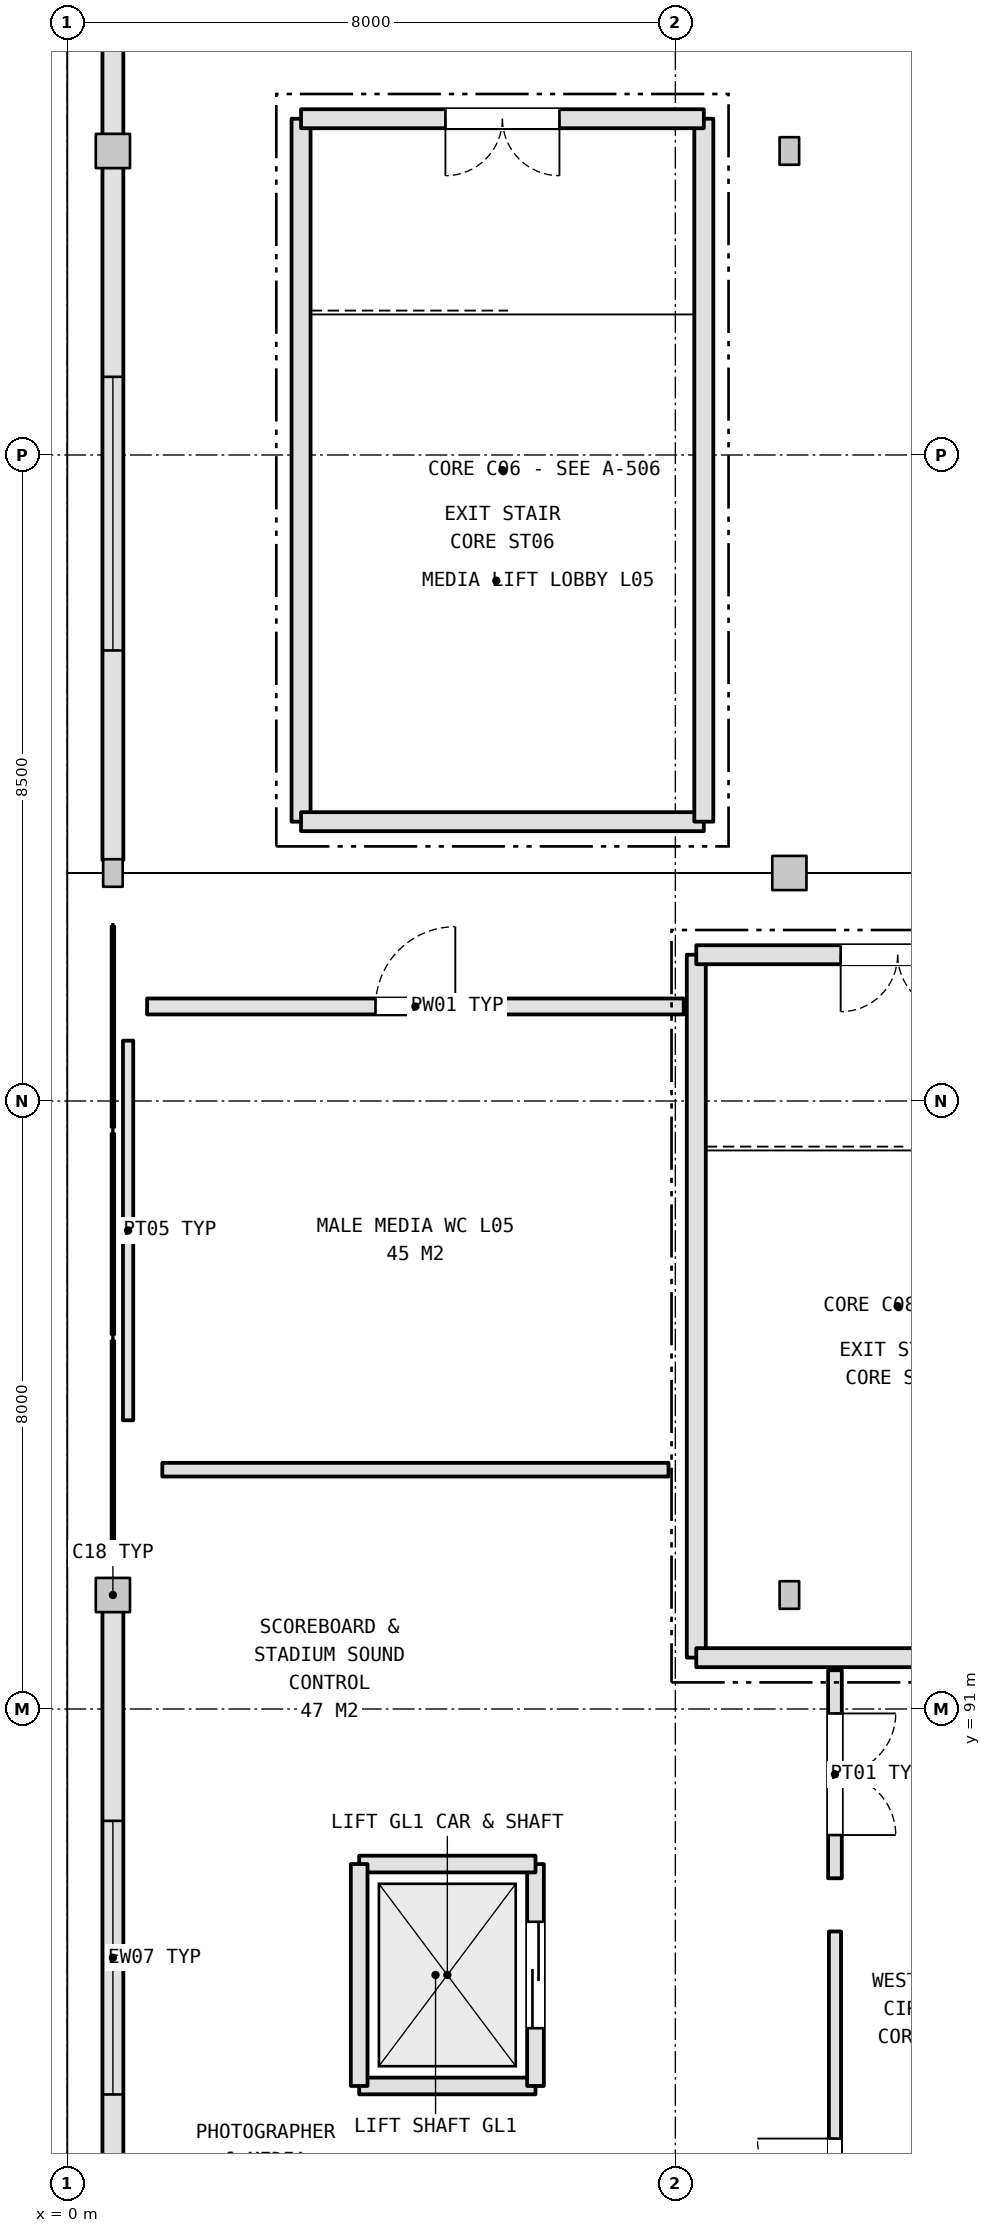
"""IFC4 building model, lengths in metres.
Left out: names, types, materials, properties, quantities, classifications, styles, units other than length and angle.
Written with IfcOpenShell. Run it as: python <this file> out.ifc"""

import sys

from ifc_helpers import new_model, si_unit, direction, frame, frame_2d, origin, origin_2d, place, context, subcontext, project, spatial, rectangle, i_section, extrude, element, fill, save


model = new_model("IFC4")
c1 = context("Model", 3, precision=1e-05, world=origin(), true_north=direction((0.0, 1.0)))
c2 = subcontext(c1, "Body", "Model", "MODEL_VIEW")
j1 = project(units=[si_unit("LENGTHUNIT", "METRE"), si_unit("PLANEANGLEUNIT", "RADIAN")], contexts=[c1])
p1 = place(None, origin())
s1 = spatial("IfcSite", under=j1, at=p1, CompositionType="ELEMENT")
p2 = place(p1, origin())
s2 = spatial("IfcBuilding", under=s1, at=p2, CompositionType="ELEMENT")
p3 = place(p2, frame((0.0, 0.0, 27.0)))
s3 = spatial("IfcBuildingStorey", under=s2, at=p3, CompositionType="ELEMENT", Elevation=27.0)
p4 = place(p3, frame((0.6, 92.5, 0.0), z_axis=(0.0, 0.0, 1.0), x_axis=(1.0, 0.0, 0.0)))
e1 = element("IfcColumn", 1, at=p4, inside=s3, PredefinedType="COLUMN", context=c2, shape_type="SweptSolid", body=[
    extrude(rectangle(XDim=0.45, YDim=0.45, at=origin_2d()), origin(), (0.0, 0.0, 1.0), 4.671),
])
p5 = place(p3, frame((0.6, 102.0, 0.0), z_axis=(0.0, 0.0, 1.0), x_axis=(1.0, 0.0, 0.0)))
e2 = element("IfcColumn", 2, at=p5, inside=s3, PredefinedType="COLUMN", context=c2, shape_type="SweptSolid", body=[
    extrude(i_section(OverallWidth=0.257, OverallDepth=0.363, WebThickness=0.013, FlangeThickness=0.022, FilletRadius=0.015, at=origin_2d()), origin(), (0.0, 0.0, 1.0), 4.671),
])
p6 = place(p3, frame((0.6, 111.5, 0.0), z_axis=(0.0, 0.0, 1.0), x_axis=(1.0, 0.0, 0.0)))
e3 = element("IfcColumn", 3, at=p6, inside=s3, PredefinedType="COLUMN", context=c2, shape_type="SweptSolid", body=[
    extrude(rectangle(XDim=0.45, YDim=0.45, at=origin_2d()), origin(), (0.0, 0.0, 1.0), 4.671),
])
p7 = place(p3, frame((9.5, 92.5, 0.0), z_axis=(0.0, 0.0, 1.0), x_axis=(1.0, 0.0, 0.0)))
e4 = element("IfcColumn", 4, at=p7, inside=s3, PredefinedType="COLUMN", context=c2, shape_type="SweptSolid", body=[
    extrude(i_section(OverallWidth=0.257, OverallDepth=0.363, WebThickness=0.013, FlangeThickness=0.022, FilletRadius=0.015, at=origin_2d()), origin(), (0.0, 0.0, 1.0), 5.428),
])
p8 = place(p3, frame((9.5, 102.0, 0.0), z_axis=(0.0, 0.0, 1.0), x_axis=(1.0, 0.0, 0.0)))
e5 = element("IfcColumn", 5, at=p8, inside=s3, PredefinedType="COLUMN", context=c2, shape_type="SweptSolid", body=[
    extrude(rectangle(XDim=0.45, YDim=0.45, at=origin_2d()), origin(), (0.0, 0.0, 1.0), 5.428),
])
p9 = place(p3, frame((9.5, 111.5, 0.0), z_axis=(0.0, 0.0, 1.0), x_axis=(1.0, 0.0, 0.0)))
e6 = element("IfcColumn", 6, at=p9, inside=s3, PredefinedType="COLUMN", context=c2, shape_type="SweptSolid", body=[
    extrude(i_section(OverallWidth=0.257, OverallDepth=0.363, WebThickness=0.013, FlangeThickness=0.022, FilletRadius=0.015, at=origin_2d()), origin(), (0.0, 0.0, 1.0), 5.428),
])
p10 = place(p3, frame((0.6, 83.169, 0.0), z_axis=(0.0, 0.0, 1.0), x_axis=(0.0, 1.0, 0.0)))
e7 = element("IfcWall", 7, at=p10, inside=s3, PredefinedType="STANDARD", context=c2, shape_type="SweptSolid", body=[
    extrude(rectangle(XDim=9.118, YDim=0.275, at=frame_2d((4.559, 0.0))), origin(), (0.0, 0.0, 1.0), 3.5),
])
p11 = place(p10, frame((2.759, 0.0, 1.05)))
e8 = element("IfcOpeningElement", 8, at=p11, cuts=e7, PredefinedType="OPENING", context=c2, shape_type="SweptSolid", body=[
    extrude(rectangle(XDim=3.6, YDim=2.0, at=frame_2d((1.8, 1.0))), frame((0.0, 0.147, 0.0), z_axis=(0.0, -1.0, 0.0), x_axis=(1.0, 0.0, 0.0)), (0.0, 0.0, 1.0), 0.295),
])
p12 = place(p3, frame((0.6, 102.169, 0.0), z_axis=(0.0, 0.0, 1.0), x_axis=(0.0, 1.0, 0.0)))
e9 = element("IfcWall", 9, at=p12, inside=s3, PredefinedType="STANDARD", context=c2, shape_type="SweptSolid", body=[
    extrude(rectangle(XDim=9.118, YDim=0.275, at=frame_2d((4.559, 0.0))), origin(), (0.0, 0.0, 1.0), 3.5),
])
p13 = place(p12, frame((2.759, 0.0, 1.05)))
e10 = element("IfcOpeningElement", 10, at=p13, cuts=e9, PredefinedType="OPENING", context=c2, shape_type="SweptSolid", body=[
    extrude(rectangle(XDim=3.6, YDim=2.0, at=frame_2d((1.8, 1.0))), frame((0.0, 0.147, 0.0), z_axis=(0.0, -1.0, 0.0), x_axis=(1.0, 0.0, 0.0)), (0.0, 0.0, 1.0), 0.295),
])
p14 = place(p3, frame((0.6, 111.713, 0.0), z_axis=(0.0, 0.0, 1.0), x_axis=(0.0, 1.0, 0.0)))
e11 = element("IfcWall", 11, at=p14, inside=s3, PredefinedType="STANDARD", context=c2, shape_type="SweptSolid", body=[
    extrude(rectangle(XDim=9.118, YDim=0.275, at=frame_2d((4.559, 0.0))), origin(), (0.0, 0.0, 1.0), 3.5),
])
p15 = place(p14, frame((2.759, 0.0, 1.05)))
e12 = element("IfcOpeningElement", 12, at=p15, cuts=e11, PredefinedType="OPENING", context=c2, shape_type="SweptSolid", body=[
    extrude(rectangle(XDim=3.6, YDim=2.0, at=frame_2d((1.8, 1.0))), frame((0.0, 0.147, 0.0), z_axis=(0.0, -1.0, 0.0), x_axis=(1.0, 0.0, 0.0)), (0.0, 0.0, 1.0), 0.295),
])
p16 = place(p3, frame((3.075, 111.925, 0.0), z_axis=(0.0, 0.0, 1.0), x_axis=(0.0, -1.0, 0.0)))
e13 = element("IfcWall", 13, at=p16, inside=s3, PredefinedType="SHEAR", context=c2, shape_type="SweptSolid", body=[
    extrude(rectangle(XDim=9.249, YDim=0.25, at=frame_2d((4.625, 0.0))), origin(), (0.0, 0.0, 1.0), 4.62),
])
p17 = place(p3, frame((3.075, 102.675, 0.0), z_axis=(0.0, 0.0, 1.0), x_axis=(1.0, 0.0, 0.0)))
e14 = element("IfcWall", 14, at=p17, inside=s3, PredefinedType="SHEAR", context=c2, shape_type="SweptSolid", body=[
    extrude(rectangle(XDim=5.299, YDim=0.25, at=frame_2d((2.649, 0.0))), origin(), (0.0, 0.0, 1.0), 4.62),
])
p18 = place(p3, frame((8.375, 102.675, 0.0), z_axis=(0.0, 0.0, 1.0), x_axis=(0.0, 1.0, 0.0)))
e15 = element("IfcWall", 15, at=p18, inside=s3, PredefinedType="SHEAR", context=c2, shape_type="SweptSolid", body=[
    extrude(rectangle(XDim=9.249, YDim=0.25, at=frame_2d((4.625, 0.0))), origin(), (0.0, 0.0, 1.0), 4.62),
])
p19 = place(p3, frame((8.375, 111.925, 0.0), z_axis=(0.0, 0.0, 1.0), x_axis=(-1.0, 0.0, 0.0)))
e16 = element("IfcWall", 16, at=p19, inside=s3, PredefinedType="SHEAR", context=c2, shape_type="SweptSolid", body=[
    extrude(rectangle(XDim=5.299, YDim=0.25, at=frame_2d((2.649, 0.0))), origin(), (0.0, 0.0, 1.0), 4.62),
])
p20 = place(p19, frame((1.9, 0.0, 0.0)))
e17 = element("IfcOpeningElement", 17, at=p20, cuts=e16, PredefinedType="OPENING", context=c2, shape_type="SweptSolid", body=[
    extrude(rectangle(XDim=1.5, YDim=2.2, at=frame_2d((0.75, 1.1))), frame((0.0, 0.135, 0.0), z_axis=(0.0, -1.0, 0.0), x_axis=(1.0, 0.0, 0.0)), (0.0, 0.0, 1.0), 0.27),
])
p21 = place(p3, frame((8.275, 100.925, 0.0), z_axis=(0.0, 0.0, 1.0), x_axis=(0.0, -1.0, 0.0)))
e18 = element("IfcWall", 18, at=p21, inside=s3, PredefinedType="SHEAR", context=c2, shape_type="SweptSolid", body=[
    extrude(rectangle(XDim=9.249, YDim=0.25, at=frame_2d((4.625, 0.0))), origin(), (0.0, 0.0, 1.0), 4.62),
])
p22 = place(p3, frame((8.275, 91.675, 0.0), z_axis=(0.0, 0.0, 1.0), x_axis=(1.0, 0.0, 0.0)))
e19 = element("IfcWall", 19, at=p22, inside=s3, PredefinedType="SHEAR", context=c2, shape_type="SweptSolid", body=[
    extrude(rectangle(XDim=5.299, YDim=0.25, at=frame_2d((2.65, 0.0))), origin(), (0.0, 0.0, 1.0), 4.62),
])
p23 = place(p3, frame((13.575, 100.925, 0.0), z_axis=(0.0, 0.0, 1.0), x_axis=(-1.0, 0.0, 0.0)))
e20 = element("IfcWall", 20, at=p23, inside=s3, PredefinedType="SHEAR", context=c2, shape_type="SweptSolid", body=[
    extrude(rectangle(XDim=5.299, YDim=0.25, at=frame_2d((2.65, 0.0))), origin(), (0.0, 0.0, 1.0), 4.62),
])
p24 = place(p23, frame((1.9, 0.0, 0.0)))
e21 = element("IfcOpeningElement", 21, at=p24, cuts=e20, PredefinedType="OPENING", context=c2, shape_type="SweptSolid", body=[
    extrude(rectangle(XDim=1.5, YDim=2.2, at=frame_2d((0.75, 1.1))), frame((0.0, 0.135, 0.0), z_axis=(0.0, -1.0, 0.0), x_axis=(1.0, 0.0, 0.0)), (0.0, 0.0, 1.0), 0.27),
])
p25 = place(p3, frame((3.84, 86.04, 0.0), z_axis=(0.0, 0.0, 1.0), x_axis=(1.0, 0.0, 0.0)))
e22 = element("IfcWall", 22, at=p25, inside=s3, PredefinedType="SHEAR", context=c2, shape_type="SweptSolid", body=[
    extrude(rectangle(XDim=2.32, YDim=0.22, at=frame_2d((1.16, 0.0))), origin(), (0.0, 0.0, 1.0), 4.62),
])
p26 = place(p3, frame((6.16, 86.04, 0.0), z_axis=(0.0, 0.0, 1.0), x_axis=(0.0, 1.0, 0.0)))
e23 = element("IfcWall", 23, at=p26, inside=s3, PredefinedType="SHEAR", context=c2, shape_type="SweptSolid", body=[
    extrude(rectangle(XDim=2.92, YDim=0.22, at=frame_2d((1.46, 0.0))), origin(), (0.0, 0.0, 1.0), 4.62),
])
p27 = place(p26, frame((0.76, 0.0, 0.0)))
e24 = element("IfcOpeningElement", 24, at=p27, cuts=e23, PredefinedType="OPENING", context=c2, shape_type="SweptSolid", body=[
    extrude(rectangle(XDim=1.4, YDim=2.3, at=frame_2d((0.7, 1.15))), frame((0.0, 0.12, 0.0), z_axis=(0.0, -1.0, 0.0), x_axis=(1.0, 0.0, 0.0)), (0.0, 0.0, 1.0), 0.24),
])
p28 = place(p3, frame((6.16, 88.96, 0.0), z_axis=(0.0, 0.0, 1.0), x_axis=(-1.0, 0.0, 0.0)))
e25 = element("IfcWall", 25, at=p28, inside=s3, PredefinedType="SHEAR", context=c2, shape_type="SweptSolid", body=[
    extrude(rectangle(XDim=2.32, YDim=0.22, at=frame_2d((1.16, 0.0))), origin(), (0.0, 0.0, 1.0), 4.62),
])
p29 = place(p3, frame((3.84, 88.96, 0.0), z_axis=(0.0, 0.0, 1.0), x_axis=(0.0, -1.0, 0.0)))
e26 = element("IfcWall", 26, at=p29, inside=s3, PredefinedType="SHEAR", context=c2, shape_type="SweptSolid", body=[
    extrude(rectangle(XDim=2.92, YDim=0.22, at=frame_2d((1.46, 0.0))), origin(), (0.0, 0.0, 1.0), 4.62),
])
p30 = place(p3, frame((10.1, 88.073, 0.0), z_axis=(0.0, 0.0, 1.0), x_axis=(0.0, -1.0, 0.0)))
e27 = element("IfcWall", 27, at=p30, inside=s3, PredefinedType="PARTITIONING", context=c2, shape_type="SweptSolid", body=[
    extrude(rectangle(XDim=6.47, YDim=0.16, at=frame_2d((3.235, 0.0))), origin(), (0.0, 0.0, 1.0), 3.5),
])
p31 = place(p30, frame((2.725, 0.0, 0.0)))
e28 = element("IfcOpeningElement", 28, at=p31, cuts=e27, PredefinedType="OPENING", context=c2, shape_type="SweptSolid", body=[
    extrude(rectangle(XDim=1.02, YDim=2.15, at=frame_2d((0.51, 1.075))), frame((0.0, 0.09, 0.0), z_axis=(0.0, -1.0, 0.0), x_axis=(1.0, 0.0, 0.0)), (0.0, 0.0, 1.0), 0.18),
])
p32 = place(p3, frame((10.1, 91.51, 0.0), z_axis=(0.0, 0.0, 1.0), x_axis=(0.0, -1.0, 0.0)))
e29 = element("IfcWall", 29, at=p32, inside=s3, PredefinedType="PARTITIONING", context=c2, shape_type="SweptSolid", body=[
    extrude(rectangle(XDim=2.737, YDim=0.18, at=frame_2d((1.369, 0.0))), origin(), (0.0, 0.0, 1.0), 3.5),
])
p33 = place(p32, frame((0.569, 0.0, 0.0)))
e30 = element("IfcOpeningElement", 30, at=p33, cuts=e29, PredefinedType="OPENING", context=c2, shape_type="SweptSolid", body=[
    extrude(rectangle(XDim=1.6, YDim=2.2, at=frame_2d((0.8, 1.1))), frame((0.0, 0.1, 0.0), z_axis=(0.0, -1.0, 0.0), x_axis=(1.0, 0.0, 0.0)), (0.0, 0.0, 1.0), 0.2),
])
p34 = place(p3, frame((1.25, 94.149, 0.0), z_axis=(0.0, 0.0, 1.0), x_axis=(1.0, 0.0, 0.0)))
e31 = element("IfcWall", 31, at=p34, inside=s3, PredefinedType="PARTITIONING", context=c2, shape_type="SweptSolid", body=[
    extrude(rectangle(XDim=6.66, YDim=0.18, at=frame_2d((3.33, 0.0))), origin(), (0.0, 0.0, 1.0), 3.5),
])
p35 = place(p3, frame((1.05, 100.244, 0.0), z_axis=(0.0, 0.0, 1.0), x_axis=(1.0, 0.0, 0.0)))
e32 = element("IfcWall", 32, at=p35, inside=s3, PredefinedType="PLUMBINGWALL", context=c2, shape_type="SweptSolid", body=[
    extrude(rectangle(XDim=7.06, YDim=0.21, at=frame_2d((3.53, 0.0))), origin(), (0.0, 0.0, 1.0), 3.5),
])
p36 = place(p35, frame((3.005, 0.0, 0.0)))
e33 = element("IfcOpeningElement", 33, at=p36, cuts=e32, PredefinedType="OPENING", context=c2, shape_type="SweptSolid", body=[
    extrude(rectangle(XDim=1.05, YDim=2.2, at=frame_2d((0.525, 1.1))), frame((0.0, 0.115, 0.0), z_axis=(0.0, -1.0, 0.0), x_axis=(1.0, 0.0, 0.0)), (0.0, 0.0, 1.0), 0.23),
])
p37 = place(p3, frame((0.8, 94.799, 0.0), z_axis=(0.0, 0.0, 1.0), x_axis=(0.0, 1.0, 0.0)))
e34 = element("IfcWall", 34, at=p37, inside=s3, PredefinedType="PARTITIONING", context=c2, shape_type="SweptSolid", body=[
    extrude(rectangle(XDim=4.995, YDim=0.135, at=frame_2d((2.498, 0.0))), origin(), (0.0, 0.0, 1.0), 3.5),
])
p38 = place(p11, origin())
e35 = element("IfcWindow", 35, at=p38, inside=s3, PartitioningType="SINGLE_PANEL", PredefinedType="WINDOW", context=c2, shape_type="SweptSolid", body=[
    extrude(rectangle(XDim=3.6, YDim=2.0, at=frame_2d((1.8, 1.0))), frame((0.0, 0.03, 0.0), z_axis=(0.0, -1.0, 0.0), x_axis=(1.0, 0.0, 0.0)), (0.0, 0.0, 1.0), 0.06),
])
fill(e8, e35)
p39 = place(p13, origin())
e36 = element("IfcWindow", 36, at=p39, inside=s3, PartitioningType="SINGLE_PANEL", PredefinedType="WINDOW", context=c2, shape_type="SweptSolid", body=[
    extrude(rectangle(XDim=3.6, YDim=2.0, at=frame_2d((1.8, 1.0))), frame((0.0, 0.03, 0.0), z_axis=(0.0, -1.0, 0.0), x_axis=(1.0, 0.0, 0.0)), (0.0, 0.0, 1.0), 0.06),
])
fill(e10, e36)
p40 = place(p20, origin())
e37 = element("IfcDoor", 37, at=p40, inside=s3, OperationType="DOUBLE_DOOR_SINGLE_SWING", PredefinedType="DOOR", context=c2, shape_type="SweptSolid", body=[
    extrude(rectangle(XDim=1.5, YDim=2.2, at=frame_2d((0.75, 1.1))), frame((0.0, 0.025, 0.0), z_axis=(0.0, -1.0, 0.0), x_axis=(1.0, 0.0, 0.0)), (0.0, 0.0, 1.0), 0.05),
])
fill(e17, e37)
p41 = place(p24, origin())
e38 = element("IfcDoor", 38, at=p41, inside=s3, OperationType="DOUBLE_DOOR_SINGLE_SWING", PredefinedType="DOOR", context=c2, shape_type="SweptSolid", body=[
    extrude(rectangle(XDim=1.5, YDim=2.2, at=frame_2d((0.75, 1.1))), frame((0.0, 0.025, 0.0), z_axis=(0.0, -1.0, 0.0), x_axis=(1.0, 0.0, 0.0)), (0.0, 0.0, 1.0), 0.05),
])
fill(e21, e38)
p42 = place(p27, origin())
e39 = element("IfcDoor", 39, at=p42, inside=s3, OperationType="DOUBLE_DOOR_SLIDING", PredefinedType="DOOR", context=c2, shape_type="SweptSolid", body=[
    extrude(rectangle(XDim=1.4, YDim=2.3, at=frame_2d((0.7, 1.15))), frame((0.0, 0.025, 0.0), z_axis=(0.0, -1.0, 0.0), x_axis=(1.0, 0.0, 0.0)), (0.0, 0.0, 1.0), 0.05),
])
fill(e24, e39)
p43 = place(p31, frame((1.02, 0.0, 0.0), z_axis=(0.0, 0.0, 1.0), x_axis=(-1.0, 0.0, 0.0)))
e40 = element("IfcDoor", 40, at=p43, inside=s3, OperationType="SINGLE_SWING_LEFT", PredefinedType="DOOR", context=c2, shape_type="SweptSolid", body=[
    extrude(rectangle(XDim=1.02, YDim=2.15, at=frame_2d((0.51, 1.075))), frame((0.0, 0.025, 0.0), z_axis=(0.0, -1.0, 0.0), x_axis=(1.0, 0.0, 0.0)), (0.0, 0.0, 1.0), 0.05),
])
fill(e28, e40)
p44 = place(p33, origin())
e41 = element("IfcDoor", 41, at=p44, inside=s3, OperationType="DOUBLE_DOOR_SINGLE_SWING", PredefinedType="DOOR", context=c2, shape_type="SweptSolid", body=[
    extrude(rectangle(XDim=1.6, YDim=2.2, at=frame_2d((0.8, 1.1))), frame((0.0, 0.025, 0.0), z_axis=(0.0, -1.0, 0.0), x_axis=(1.0, 0.0, 0.0)), (0.0, 0.0, 1.0), 0.05),
])
fill(e30, e41)
p45 = place(p36, origin())
e42 = element("IfcDoor", 42, at=p45, inside=s3, OperationType="SINGLE_SWING_RIGHT", PredefinedType="DOOR", context=c2, shape_type="SweptSolid", body=[
    extrude(rectangle(XDim=1.05, YDim=2.2, at=frame_2d((0.525, 1.1))), frame((0.0, 0.025, 0.0), z_axis=(0.0, -1.0, 0.0), x_axis=(1.0, 0.0, 0.0)), (0.0, 0.0, 1.0), 0.05),
])
fill(e33, e42)
save(model, sys.argv[1])
